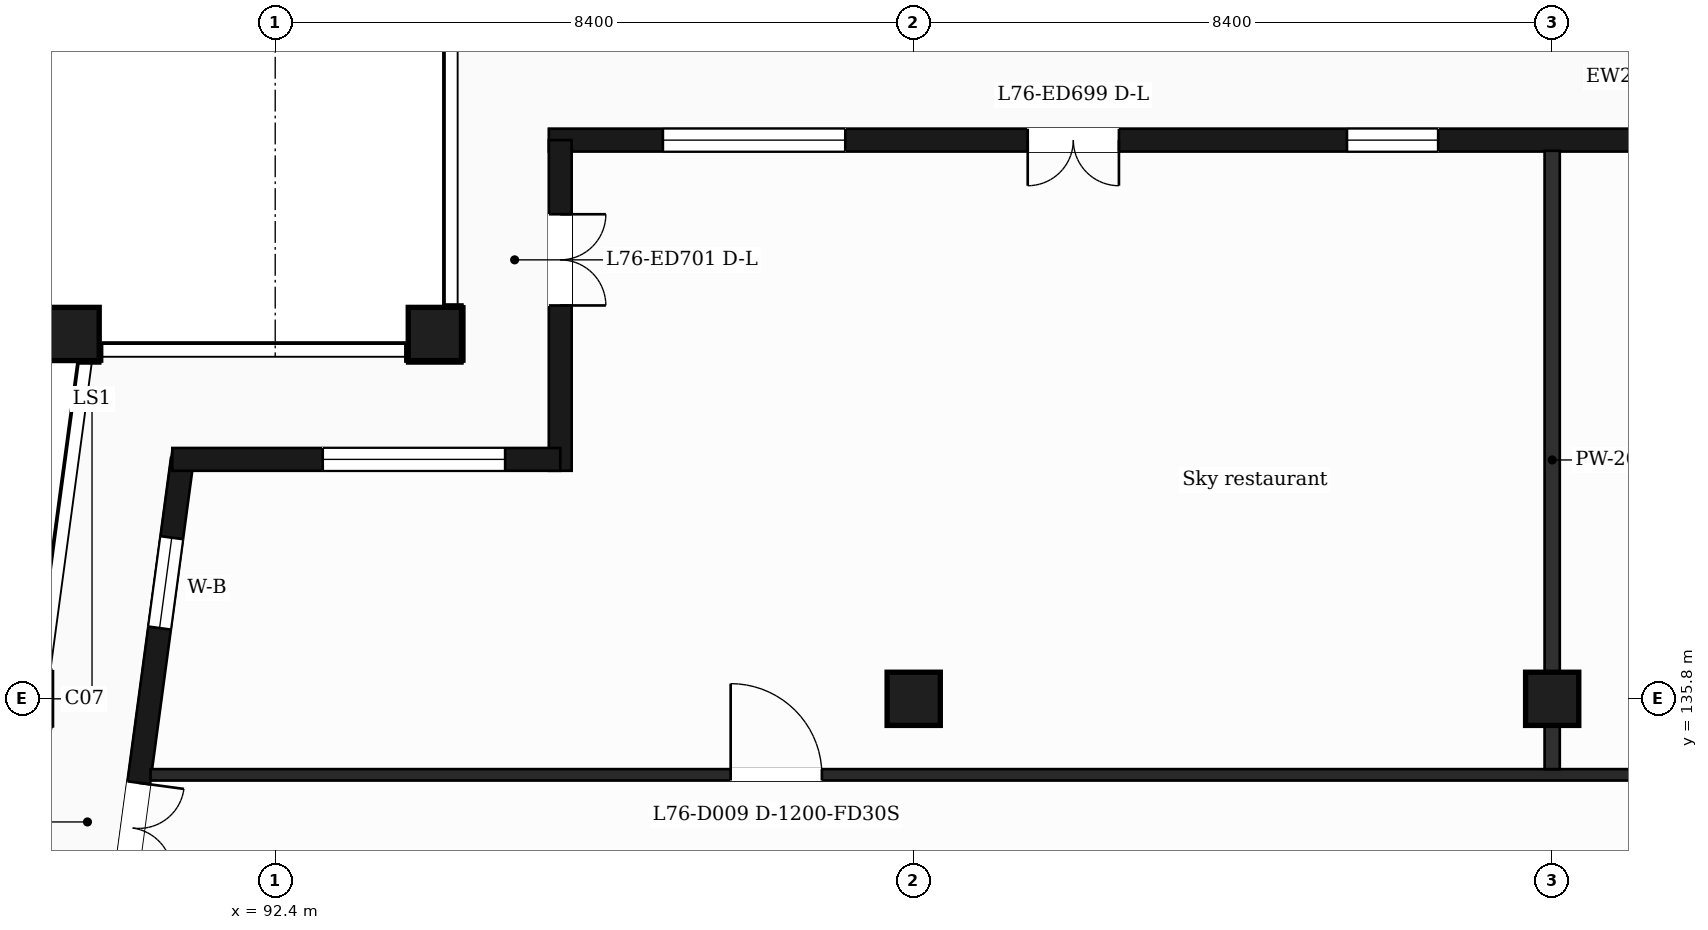
"""IFC4 building model, lengths in metres.
Left out: names, types, materials, properties, quantities, classifications, styles, units other than length and angle.
Written with IfcOpenShell. Run it as: python <this file> out.ifc"""

import sys

from ifc_helpers import new_model, si_unit, direction, frame, frame_2d, origin, origin_2d, place, context, subcontext, project, spatial, rectangle, extrude, element, fill, save


model = new_model("IFC4")
c1 = context("Model", 3, precision=1e-05, world=origin(), true_north=direction((0.0, 1.0)))
c2 = subcontext(c1, "Body", "Model", "MODEL_VIEW")
j1 = project(units=[si_unit("LENGTHUNIT", "METRE"), si_unit("PLANEANGLEUNIT", "RADIAN")], contexts=[c1])
p1 = place(None, origin())
s1 = spatial("IfcSite", under=j1, at=p1, CompositionType="ELEMENT")
p2 = place(p1, origin())
s2 = spatial("IfcBuilding", under=s1, at=p2, CompositionType="ELEMENT")
p3 = place(p2, frame((0.0, 0.0, 315.4)))
s3 = spatial("IfcBuildingStorey", under=s2, at=p3, CompositionType="ELEMENT", Elevation=315.4)
for number, where, z_axis, x_axis in (
    (1, (94.5, 140.6, 0.0), (0.0, 0.0, 1.0), (1.0, 0.0, 0.0)),
    (2, (89.735, 140.6, 0.0), (0.0, 0.0, 1.0), (1.0, 0.0, 0.0)),
    (3, (100.8, 135.8, 0.0), (0.0, 0.0, 1.0), (1.0, 0.0, 0.0)),
    (4, (109.2, 135.8, 0.0), (0.0, 0.0, 1.0), (1.0, 0.0, 0.0)),
):
    element("IfcColumn", number, at=place(p3, frame(where, z_axis=z_axis, x_axis=x_axis)), inside=s3, PredefinedType="COLUMN", context=c2, shape_type="SweptSolid", body=[
        extrude(rectangle(XDim=0.7, YDim=0.7, at=origin_2d()), origin(), (0.0, 0.0, 1.0), 4.5),
    ])
p4 = place(p3, frame((91.177, 138.95, 0.0), z_axis=(0.0, 0.0, 1.0), x_axis=(-0.133426664613, -0.991058689065, 0.0)))
e5 = element("IfcWall", 5, at=p4, inside=s3, PredefinedType="SOLIDWALL", context=c2, shape_type="SweptSolid", body=[
    extrude(rectangle(XDim=6.609, YDim=0.3, at=frame_2d((3.305, 0.0))), origin(), (0.0, 0.0, 1.0), 4.05),
])
p5 = place(p4, frame((1.039, 0.0, 0.9)))
e6 = element("IfcOpeningElement", 6, at=p5, cuts=e5, PredefinedType="OPENING", context=c2, shape_type="SweptSolid", body=[
    extrude(rectangle(XDim=1.2, YDim=2.1, at=frame_2d((0.6, 1.05))), frame((0.0, 0.16, 0.0), z_axis=(0.0, -1.0, 0.0), x_axis=(1.0, 0.0, 0.0)), (0.0, 0.0, 1.0), 0.32),
])
p6 = place(p4, frame((4.294, 0.0, 0.0)))
e7 = element("IfcOpeningElement", 7, at=p6, cuts=e5, PredefinedType="OPENING", context=c2, shape_type="SweptSolid", body=[
    extrude(rectangle(XDim=1.2, YDim=2.4, at=frame_2d((0.6, 1.2))), frame((0.0, 0.16, 0.0), z_axis=(0.0, -1.0, 0.0), x_axis=(1.0, 0.0, 0.0)), (0.0, 0.0, 1.0), 0.32),
])
p7 = place(p3, frame((110.4, 143.15, 0.0), z_axis=(0.0, 0.0, 1.0), x_axis=(-1.0, 0.0, 0.0)))
e8 = element("IfcWall", 8, at=p7, inside=s3, PredefinedType="SOLIDWALL", context=c2, shape_type="SweptSolid", body=[
    extrude(rectangle(XDim=14.4, YDim=0.3, at=frame_2d((7.2, 0.0))), origin(), (0.0, 0.0, 1.0), 4.05),
])
p8 = place(p7, frame((2.7, 0.0, 0.9)))
e9 = element("IfcOpeningElement", 9, at=p8, cuts=e8, PredefinedType="OPENING", context=c2, shape_type="SweptSolid", body=[
    extrude(rectangle(XDim=1.2, YDim=2.1, at=frame_2d((0.6, 1.05))), frame((0.0, 0.16, 0.0), z_axis=(0.0, -1.0, 0.0), x_axis=(1.0, 0.0, 0.0)), (0.0, 0.0, 1.0), 0.32),
])
p9 = place(p7, frame((6.9, 0.0, 0.0)))
e10 = element("IfcOpeningElement", 10, at=p9, cuts=e8, PredefinedType="OPENING", context=c2, shape_type="SweptSolid", body=[
    extrude(rectangle(XDim=1.2, YDim=2.4, at=frame_2d((0.6, 1.2))), frame((0.0, 0.16, 0.0), z_axis=(0.0, -1.0, 0.0), x_axis=(1.0, 0.0, 0.0)), (0.0, 0.0, 1.0), 0.32),
])
p10 = place(p7, frame((10.5, 0.0, 0.9)))
e11 = element("IfcOpeningElement", 11, at=p10, cuts=e8, PredefinedType="OPENING", context=c2, shape_type="SweptSolid", body=[
    extrude(rectangle(XDim=2.4, YDim=2.1, at=frame_2d((1.2, 1.05))), frame((0.0, 0.16, 0.0), z_axis=(0.0, -1.0, 0.0), x_axis=(1.0, 0.0, 0.0)), (0.0, 0.0, 1.0), 0.32),
])
p11 = place(p3, frame((96.15, 143.15, 0.0), z_axis=(0.0, 0.0, 1.0), x_axis=(0.0, -1.0, 0.0)))
e12 = element("IfcWall", 12, at=p11, inside=s3, PredefinedType="SOLIDWALL", context=c2, shape_type="SweptSolid", body=[
    extrude(rectangle(XDim=4.35, YDim=0.3, at=frame_2d((2.175, 0.0))), origin(), (0.0, 0.0, 1.0), 4.05),
])
p12 = place(p11, frame((0.975, 0.0, 0.0)))
e13 = element("IfcOpeningElement", 13, at=p12, cuts=e12, PredefinedType="OPENING", context=c2, shape_type="SweptSolid", body=[
    extrude(rectangle(XDim=1.2, YDim=2.4, at=frame_2d((0.6, 1.2))), frame((0.0, 0.16, 0.0), z_axis=(0.0, -1.0, 0.0), x_axis=(1.0, 0.0, 0.0)), (0.0, 0.0, 1.0), 0.32),
])
p13 = place(p3, frame((96.15, 138.95, 0.0), z_axis=(0.0, 0.0, 1.0), x_axis=(-1.0, 0.0, 0.0)))
e14 = element("IfcWall", 14, at=p13, inside=s3, PredefinedType="SOLIDWALL", context=c2, shape_type="SweptSolid", body=[
    extrude(rectangle(XDim=5.104, YDim=0.3, at=frame_2d((2.552, 0.0))), origin(), (0.0, 0.0, 1.0), 4.05),
])
p14 = place(p13, frame((0.725, 0.0, 0.9)))
e15 = element("IfcOpeningElement", 15, at=p14, cuts=e14, PredefinedType="OPENING", context=c2, shape_type="SweptSolid", body=[
    extrude(rectangle(XDim=2.4, YDim=2.1, at=frame_2d((1.2, 1.05))), frame((0.0, 0.16, 0.0), z_axis=(0.0, -1.0, 0.0), x_axis=(1.0, 0.0, 0.0)), (0.0, 0.0, 1.0), 0.32),
])
p15 = place(p3, frame((90.76, 134.8, 0.0), z_axis=(0.0, 0.0, 1.0), x_axis=(1.0, 0.0, 0.0)))
e16 = element("IfcWall", 16, at=p15, inside=s3, PredefinedType="PARTITIONING", context=c2, shape_type="SweptSolid", body=[
    extrude(rectangle(XDim=45.24, YDim=0.15, at=frame_2d((22.62, 0.0))), origin(), (0.0, 0.0, 1.0), 4.05),
])
p16 = place(p15, frame((7.632, 0.0, 0.0)))
e17 = element("IfcOpeningElement", 17, at=p16, cuts=e16, PredefinedType="OPENING", context=c2, shape_type="SweptSolid", body=[
    extrude(rectangle(XDim=1.2, YDim=2.1, at=frame_2d((0.6, 1.05))), frame((0.0, 0.085, 0.0), z_axis=(0.0, -1.0, 0.0), x_axis=(1.0, 0.0, 0.0)), (0.0, 0.0, 1.0), 0.17),
])
p17 = place(p15, frame((22.14, 0.0, 0.0)))
e18 = element("IfcOpeningElement", 18, at=p17, cuts=e16, PredefinedType="OPENING", context=c2, shape_type="SweptSolid", body=[
    extrude(rectangle(XDim=1.0, YDim=2.1, at=frame_2d((0.5, 1.05))), frame((0.0, 0.085, 0.0), z_axis=(0.0, -1.0, 0.0), x_axis=(1.0, 0.0, 0.0)), (0.0, 0.0, 1.0), 0.17),
])
p18 = place(p15, frame((30.44, 0.0, 0.0)))
e19 = element("IfcOpeningElement", 19, at=p18, cuts=e16, PredefinedType="OPENING", context=c2, shape_type="SweptSolid", body=[
    extrude(rectangle(XDim=1.2, YDim=2.1, at=frame_2d((0.6, 1.05))), frame((0.0, 0.085, 0.0), z_axis=(0.0, -1.0, 0.0), x_axis=(1.0, 0.0, 0.0)), (0.0, 0.0, 1.0), 0.17),
])
p19 = place(p15, frame((39.64, 0.0, 0.0)))
e20 = element("IfcOpeningElement", 20, at=p19, cuts=e16, PredefinedType="OPENING", context=c2, shape_type="SweptSolid", body=[
    extrude(rectangle(XDim=1.2, YDim=2.1, at=frame_2d((0.6, 1.05))), frame((0.0, 0.085, 0.0), z_axis=(0.0, -1.0, 0.0), x_axis=(1.0, 0.0, 0.0)), (0.0, 0.0, 1.0), 0.17),
])
p20 = place(p3, frame((109.2, 134.875, 0.0), z_axis=(0.0, 0.0, 1.0), x_axis=(0.0, 1.0, 0.0)))
e21 = element("IfcWall", 21, at=p20, inside=s3, PredefinedType="PARTITIONING", context=c2, shape_type="SweptSolid", body=[
    extrude(rectangle(XDim=8.135, YDim=0.2, at=frame_2d((4.067, 0.0))), origin(), (0.0, 0.0, 1.0), 4.05),
])
p21 = place(p5, origin())
e22 = element("IfcWindow", 22, at=p21, inside=s3, PartitioningType="SINGLE_PANEL", PredefinedType="WINDOW", context=c2, shape_type="SweptSolid", body=[
    extrude(rectangle(XDim=1.2, YDim=2.1, at=frame_2d((0.6, 1.05))), frame((0.0, 0.03, 0.0), z_axis=(0.0, -1.0, 0.0), x_axis=(1.0, 0.0, 0.0)), (0.0, 0.0, 1.0), 0.06),
])
fill(e6, e22)
p22 = place(p6, origin())
e23 = element("IfcDoor", 23, at=p22, inside=s3, OperationType="DOUBLE_DOOR_SINGLE_SWING", PredefinedType="DOOR", context=c2, shape_type="SweptSolid", body=[
    extrude(rectangle(XDim=1.2, YDim=2.4, at=frame_2d((0.6, 1.2))), frame((0.0, 0.025, 0.0), z_axis=(0.0, -1.0, 0.0), x_axis=(1.0, 0.0, 0.0)), (0.0, 0.0, 1.0), 0.05),
])
fill(e7, e23)
p23 = place(p8, origin())
e24 = element("IfcWindow", 24, at=p23, inside=s3, PartitioningType="SINGLE_PANEL", PredefinedType="WINDOW", context=c2, shape_type="SweptSolid", body=[
    extrude(rectangle(XDim=1.2, YDim=2.1, at=frame_2d((0.6, 1.05))), frame((0.0, 0.03, 0.0), z_axis=(0.0, -1.0, 0.0), x_axis=(1.0, 0.0, 0.0)), (0.0, 0.0, 1.0), 0.06),
])
fill(e9, e24)
p24 = place(p9, origin())
e25 = element("IfcDoor", 25, at=p24, inside=s3, OperationType="DOUBLE_DOOR_SINGLE_SWING", PredefinedType="DOOR", context=c2, shape_type="SweptSolid", body=[
    extrude(rectangle(XDim=1.2, YDim=2.4, at=frame_2d((0.6, 1.2))), frame((0.0, 0.025, 0.0), z_axis=(0.0, -1.0, 0.0), x_axis=(1.0, 0.0, 0.0)), (0.0, 0.0, 1.0), 0.05),
])
fill(e10, e25)
p25 = place(p10, origin())
e26 = element("IfcWindow", 26, at=p25, inside=s3, PartitioningType="SINGLE_PANEL", PredefinedType="WINDOW", context=c2, shape_type="SweptSolid", body=[
    extrude(rectangle(XDim=2.4, YDim=2.1, at=frame_2d((1.2, 1.05))), frame((0.0, 0.03, 0.0), z_axis=(0.0, -1.0, 0.0), x_axis=(1.0, 0.0, 0.0)), (0.0, 0.0, 1.0), 0.06),
])
fill(e11, e26)
p26 = place(p12, origin())
e27 = element("IfcDoor", 27, at=p26, inside=s3, OperationType="DOUBLE_DOOR_SINGLE_SWING", PredefinedType="DOOR", context=c2, shape_type="SweptSolid", body=[
    extrude(rectangle(XDim=1.2, YDim=2.4, at=frame_2d((0.6, 1.2))), frame((0.0, 0.025, 0.0), z_axis=(0.0, -1.0, 0.0), x_axis=(1.0, 0.0, 0.0)), (0.0, 0.0, 1.0), 0.05),
])
fill(e13, e27)
p27 = place(p14, origin())
e28 = element("IfcWindow", 28, at=p27, inside=s3, PartitioningType="SINGLE_PANEL", PredefinedType="WINDOW", context=c2, shape_type="SweptSolid", body=[
    extrude(rectangle(XDim=2.4, YDim=2.1, at=frame_2d((1.2, 1.05))), frame((0.0, 0.03, 0.0), z_axis=(0.0, -1.0, 0.0), x_axis=(1.0, 0.0, 0.0)), (0.0, 0.0, 1.0), 0.06),
])
fill(e15, e28)
p28 = place(p16, origin())
e29 = element("IfcDoor", 29, at=p28, inside=s3, OperationType="SINGLE_SWING_LEFT", PredefinedType="DOOR", context=c2, shape_type="SweptSolid", body=[
    extrude(rectangle(XDim=1.2, YDim=2.1, at=frame_2d((0.6, 1.05))), frame((0.0, 0.025, 0.0), z_axis=(0.0, -1.0, 0.0), x_axis=(1.0, 0.0, 0.0)), (0.0, 0.0, 1.0), 0.05),
])
fill(e17, e29)
save(model, sys.argv[1])
